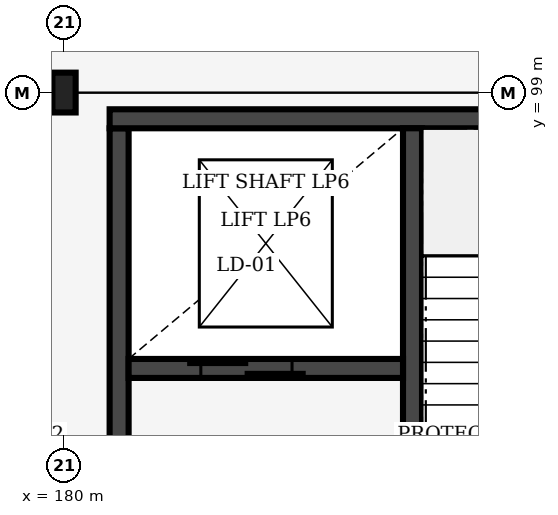
"""IFC4 building model, lengths in metres.
Left out: names, types, materials, properties, quantities, classifications, styles, units other than length and angle.
Written with IfcOpenShell. Run it as: python <this file> out.ifc"""

import sys

from ifc_helpers import new_model, si_unit, direction, frame, frame_2d, origin, origin_2d, place, context, subcontext, project, spatial, rectangle, i_section, extrude, element, fill, save


model = new_model("IFC4")
c1 = context("Model", 3, precision=1e-05, world=origin(), true_north=direction((0.0, 1.0)))
c2 = subcontext(c1, "Body", "Model", "MODEL_VIEW")
j1 = project(units=[si_unit("LENGTHUNIT", "METRE"), si_unit("PLANEANGLEUNIT", "RADIAN")], contexts=[c1])
p1 = place(None, origin())
s1 = spatial("IfcSite", under=j1, at=p1, CompositionType="ELEMENT")
p2 = place(p1, origin())
s2 = spatial("IfcBuilding", under=s1, at=p2, CompositionType="ELEMENT")
p3 = place(p2, frame((0.0, 0.0, 6.0)))
s3 = spatial("IfcBuildingStorey", under=s2, at=p3, CompositionType="ELEMENT", Elevation=6.0)
p4 = place(p3, frame((180.0, 99.0, 0.0), z_axis=(0.0, 0.0, 1.0), x_axis=(1.0, 0.0, 0.0)))
e1 = element("IfcColumn", 1, at=p4, inside=s3, PredefinedType="COLUMN", context=c2, shape_type="SweptSolid", body=[
    extrude(i_section(OverallWidth=0.306, OverallDepth=0.524, WebThickness=0.021, FlangeThickness=0.04, FilletRadius=0.027, at=origin_2d()), origin(), (0.0, 0.0, 1.0), 6.0),
])
p5 = place(p3, frame((180.725, 90.47, 0.0), z_axis=(0.0, 0.0, 1.0), x_axis=(0.0, 1.0, 0.0)))
e2 = element("IfcWall", 2, at=p5, inside=s3, PredefinedType="SHEAR", context=c2, shape_type="SweptSolid", body=[
    extrude(rectangle(XDim=8.06, YDim=0.25, at=frame_2d((4.03, 0.0))), origin(), (0.0, 0.0, 1.0), 5.64),
])
p6 = place(p5, frame((1.15, 0.0, 0.0)))
e3 = element("IfcOpeningElement", 3, at=p6, cuts=e2, PredefinedType="OPENING", context=c2, shape_type="SweptSolid", body=[
    extrude(rectangle(XDim=1.6, YDim=2.2, at=frame_2d((0.8, 1.1))), frame((0.0, 0.135, 0.0), z_axis=(0.0, -1.0, 0.0), x_axis=(1.0, 0.0, 0.0)), (0.0, 0.0, 1.0), 0.27),
])
p7 = place(p3, frame((180.6, 98.655, 0.0), z_axis=(0.0, 0.0, 1.0), x_axis=(1.0, 0.0, 0.0)))
e4 = element("IfcWall", 4, at=p7, inside=s3, PredefinedType="SHEAR", context=c2, shape_type="SweptSolid", body=[
    extrude(rectangle(XDim=7.8, YDim=0.25, at=frame_2d((3.9, 0.0))), origin(), (0.0, 0.0, 1.0), 5.64),
])
p8 = place(p3, frame((184.585, 90.47, 0.0), z_axis=(0.0, 0.0, 1.0), x_axis=(0.0, 1.0, 0.0)))
e5 = element("IfcWall", 5, at=p8, inside=s3, PredefinedType="SHEAR", context=c2, shape_type="SweptSolid", body=[
    extrude(rectangle(XDim=8.06, YDim=0.25, at=frame_2d((4.03, 0.0))), origin(), (0.0, 0.0, 1.0), 5.64),
])
p9 = place(p8, frame((0.25, 0.0, 0.0)))
e6 = element("IfcOpeningElement", 6, at=p9, cuts=e5, PredefinedType="OPENING", context=c2, shape_type="SweptSolid", body=[
    extrude(rectangle(XDim=1.15, YDim=2.15, at=frame_2d((0.575, 1.075))), frame((0.0, 0.135, 0.0), z_axis=(0.0, -1.0, 0.0), x_axis=(1.0, 0.0, 0.0)), (0.0, 0.0, 1.0), 0.27),
])
p10 = place(p3, frame((180.85, 95.37, 0.0), z_axis=(0.0, 0.0, 1.0), x_axis=(1.0, 0.0, 0.0)))
e7 = element("IfcWall", 7, at=p10, inside=s3, PredefinedType="SHEAR", context=c2, shape_type="SweptSolid", body=[
    extrude(rectangle(XDim=3.61, YDim=0.25, at=frame_2d((1.805, 0.0))), origin(), (0.0, 0.0, 1.0), 5.64),
])
p11 = place(p10, frame((0.95, 0.0, 0.0)))
e8 = element("IfcOpeningElement", 8, at=p11, cuts=e7, PredefinedType="OPENING", context=c2, shape_type="SweptSolid", body=[
    extrude(rectangle(XDim=1.2, YDim=2.2, at=frame_2d((0.6, 1.1))), frame((0.0, 0.135, 0.0), z_axis=(0.0, -1.0, 0.0), x_axis=(1.0, 0.0, 0.0)), (0.0, 0.0, 1.0), 0.27),
])
p12 = place(p11, origin())
e9 = element("IfcDoor", 9, at=p12, inside=s3, OperationType="DOUBLE_DOOR_SLIDING", PredefinedType="DOOR", context=c2, shape_type="SweptSolid", body=[
    extrude(rectangle(XDim=1.2, YDim=2.2, at=frame_2d((0.6, 1.1))), frame((0.0, 0.025, 0.0), z_axis=(0.0, -1.0, 0.0), x_axis=(1.0, 0.0, 0.0)), (0.0, 0.0, 1.0), 0.05),
])
fill(e8, e9)
save(model, sys.argv[1])
